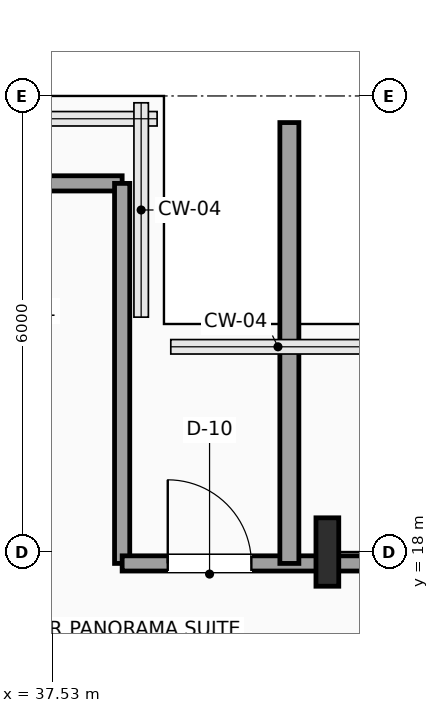
"""IFC4 building model, lengths in metres.
Left out: names, types, materials, properties, quantities, classifications, styles, units other than length and angle.
Written with IfcOpenShell. Run it as: python <this file> out.ifc"""

import sys

from ifc_helpers import new_model, si_unit, direction, frame, frame_2d, origin, origin_2d, place, context, subcontext, project, spatial, rectangle, i_section, extrude, element, fill, save


model = new_model("IFC4")
c1 = context("Model", 3, precision=1e-05, world=origin(), true_north=direction((0.0, 1.0)))
c2 = subcontext(c1, "Body", "Model", "MODEL_VIEW")
j1 = project(units=[si_unit("LENGTHUNIT", "METRE"), si_unit("PLANEANGLEUNIT", "RADIAN")], contexts=[c1])
p1 = place(None, origin())
s1 = spatial("IfcSite", under=j1, at=p1, CompositionType="ELEMENT")
p2 = place(p1, origin())
s2 = spatial("IfcBuilding", under=s1, at=p2, CompositionType="ELEMENT")
p3 = place(p2, frame((0.0, 0.0, 184.2)))
s3 = spatial("IfcBuildingStorey", under=s2, at=p3, CompositionType="ELEMENT", Elevation=184.2)
p4 = place(p3, frame((41.15, 18.0, 0.0), z_axis=(0.0, 0.0, 1.0), x_axis=(1.0, 0.0, 0.0)))
e1 = element("IfcColumn", 1, at=p4, inside=s3, PredefinedType="COLUMN", context=c2, shape_type="SweptSolid", body=[
    extrude(i_section(OverallWidth=0.3, OverallDepth=0.9, WebThickness=0.019, FlangeThickness=0.035, FilletRadius=0.03, at=origin_2d()), origin(), (0.0, 0.0, 1.0), 3.75),
])
p5 = place(p3, frame((36.35, 22.85, 0.0), z_axis=(0.0, 0.0, 1.0), x_axis=(1.0, 0.0, 0.0)))
e2 = element("IfcWall", 2, at=p5, inside=s3, PredefinedType="SOLIDWALL", context=c2, shape_type="SweptSolid", body=[
    extrude(rectangle(XDim=2.1, YDim=0.2, at=frame_2d((1.05, 0.0))), origin(), (0.0, 0.0, 1.0), 3.54),
])
p6 = place(p3, frame((38.45, 22.85, 0.0), z_axis=(0.0, 0.0, 1.0), x_axis=(0.0, -1.0, 0.0)))
e3 = element("IfcWall", 3, at=p6, inside=s3, PredefinedType="SOLIDWALL", context=c2, shape_type="SweptSolid", body=[
    extrude(rectangle(XDim=5.0, YDim=0.2, at=frame_2d((2.5, 0.0))), origin(), (0.0, 0.0, 1.0), 3.54),
])
p7 = place(p3, frame((38.45, 17.85, 0.0), z_axis=(0.0, 0.0, 1.0), x_axis=(1.0, 0.0, 0.0)))
e4 = element("IfcWall", 4, at=p7, inside=s3, PredefinedType="SOLIDWALL", context=c2, shape_type="SweptSolid", body=[
    extrude(rectangle(XDim=3.25, YDim=0.2, at=frame_2d((1.625, 0.0))), origin(), (0.0, 0.0, 1.0), 3.132),
])
p8 = place(p7, frame((0.6, 0.0, 0.0)))
e5 = element("IfcOpeningElement", 5, at=p8, cuts=e4, PredefinedType="OPENING", context=c2, shape_type="SweptSolid", body=[
    extrude(rectangle(XDim=1.1, YDim=2.25, at=frame_2d((0.55, 1.125))), frame((0.0, 0.11, 0.0), z_axis=(0.0, -1.0, 0.0), x_axis=(1.0, 0.0, 0.0)), (0.0, 0.0, 1.0), 0.22),
])
p9 = place(p3, frame((40.65, 17.85, 0.0), z_axis=(0.0, 0.0, 1.0), x_axis=(0.0, 1.0, 0.0)))
e6 = element("IfcWall", 6, at=p9, inside=s3, PredefinedType="PARTITIONING", context=c2, shape_type="SweptSolid", body=[
    extrude(rectangle(XDim=5.8, YDim=0.25, at=frame_2d((2.9, 0.0))), origin(), (0.0, 0.0, 1.0), 3.54),
])
p10 = place(p8, origin())
e7 = element("IfcDoor", 7, at=p10, inside=s3, OperationType="SINGLE_SWING_LEFT", PredefinedType="DOOR", context=c2, shape_type="SweptSolid", body=[
    extrude(rectangle(XDim=1.1, YDim=2.25, at=frame_2d((0.55, 1.125))), frame((0.0, 0.025, 0.0), z_axis=(0.0, -1.0, 0.0), x_axis=(1.0, 0.0, 0.0)), (0.0, 0.0, 1.0), 0.05),
])
fill(e5, e7)
save(model, sys.argv[1])
